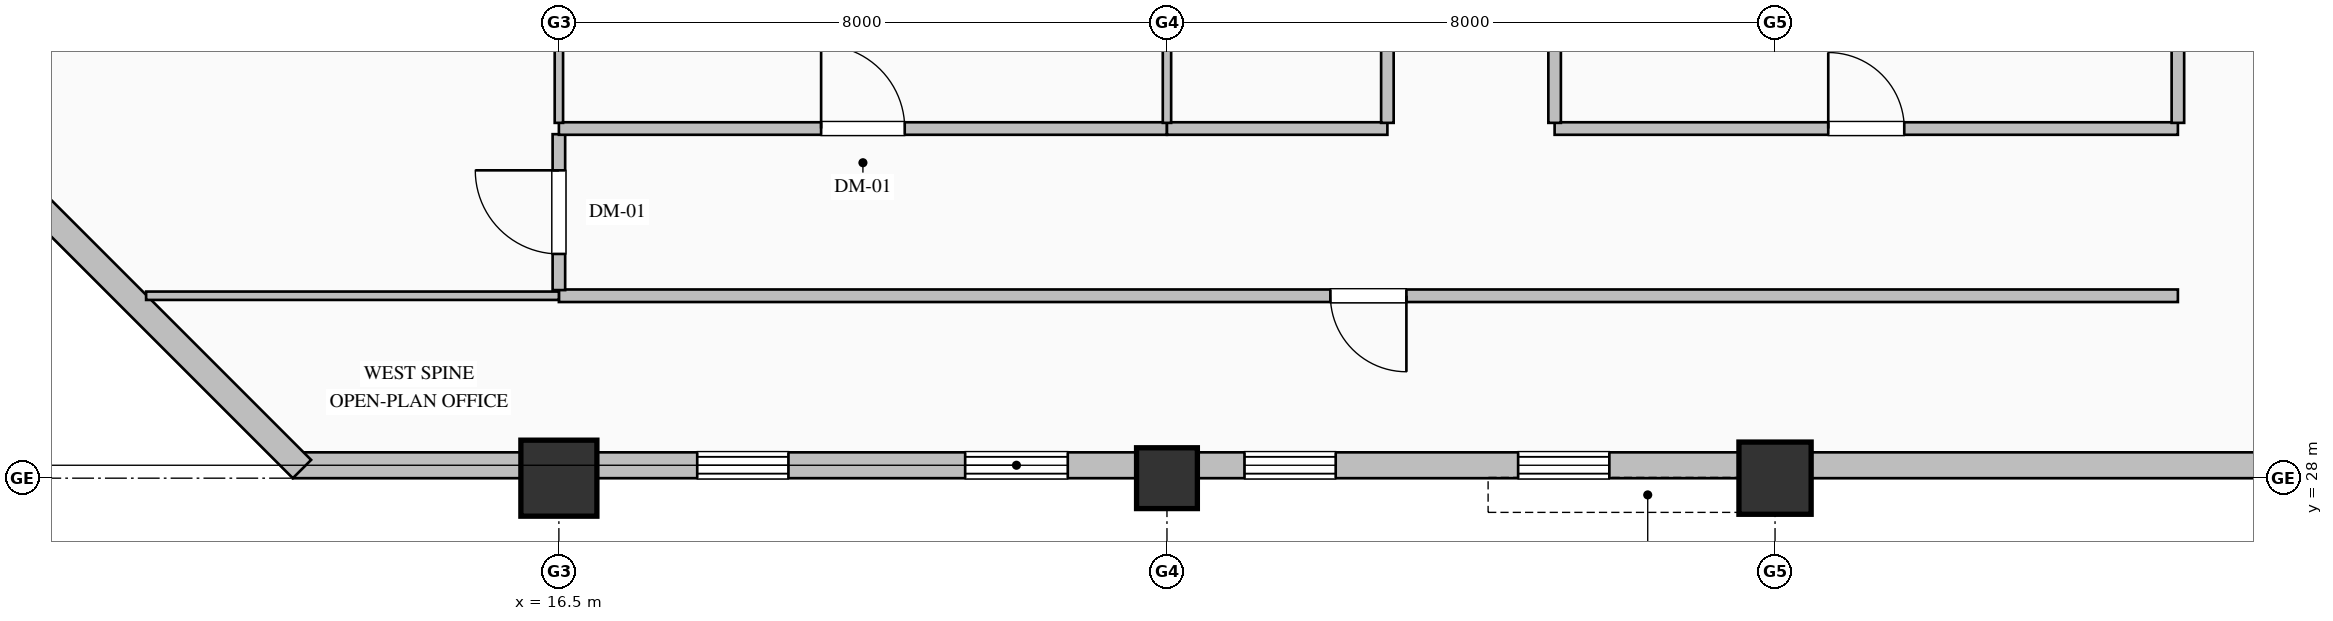
"""IFC4 building model, lengths in metres.
Left out: names, types, materials, properties, quantities, classifications, styles, units other than length and angle.
Written with IfcOpenShell. Run it as: python <this file> out.ifc"""

import sys

from ifc_helpers import new_model, si_unit, direction, frame, frame_2d, origin, origin_2d, place, context, subcontext, project, spatial, rectangle, hollow_rectangle, hollow_circle, extrude, element, fill, save


model = new_model("IFC4")
c1 = context("Model", 3, precision=1e-05, world=origin(), true_north=direction((0.0, 1.0)))
c2 = subcontext(c1, "Body", "Model", "MODEL_VIEW")
j1 = project(units=[si_unit("LENGTHUNIT", "METRE"), si_unit("PLANEANGLEUNIT", "RADIAN")], contexts=[c1])
p1 = place(None, origin())
s1 = spatial("IfcSite", under=j1, at=p1, CompositionType="ELEMENT")
p2 = place(p1, origin())
s2 = spatial("IfcBuilding", under=s1, at=p2, CompositionType="ELEMENT")
p3 = place(p2, frame((0.0, 0.0, 221.8)))
s3 = spatial("IfcBuildingStorey", under=s2, at=p3, CompositionType="ELEMENT", Elevation=221.8)
p4 = place(p3, frame((16.5, 28.0, 0.0), z_axis=(0.0, 0.0, 1.0), x_axis=(1.0, 0.0, 0.0)))
e1 = element("IfcColumn", 1, at=p4, inside=s3, PredefinedType="COLUMN", context=c2, shape_type="SweptSolid", body=[
    extrude(hollow_circle(Radius=0.5, WallThickness=0.036, at=origin_2d()), origin(), (0.0, 0.0, 1.0), 4.0),
])
p5 = place(p3, frame((24.5, 28.0, 0.0), z_axis=(0.0, 0.0, 1.0), x_axis=(1.0, 0.0, 0.0)))
e2 = element("IfcColumn", 2, at=p5, inside=s3, PredefinedType="COLUMN", context=c2, shape_type="SweptSolid", body=[
    extrude(hollow_rectangle(XDim=0.8, YDim=0.8, WallThickness=0.032, at=origin_2d()), origin(), (0.0, 0.0, 1.0), 4.0),
])
p6 = place(p3, frame((32.5, 28.0, 0.0), z_axis=(0.0, 0.0, 1.0), x_axis=(1.0, 0.0, 0.0)))
e3 = element("IfcColumn", 3, at=p6, inside=s3, PredefinedType="COLUMN", context=c2, shape_type="SweptSolid", body=[
    extrude(hollow_rectangle(XDim=0.95, YDim=0.95, WallThickness=0.036, at=origin_2d()), origin(), (0.0, 0.0, 1.0), 4.0),
])
p7 = place(p3, frame((40.52, 28.17, 0.0), z_axis=(0.0, 0.0, 1.0), x_axis=(-1.0, 0.0, 0.0)))
e4 = element("IfcWall", 4, at=p7, inside=s3, PredefinedType="SOLIDWALL", context=c2, shape_type="SweptSolid", body=[
    extrude(rectangle(XDim=27.52, YDim=0.34, at=frame_2d((13.76, 0.0))), origin(), (0.0, 0.0, 1.0), 3.187),
])
p8 = place(p7, frame((10.2, 0.0, 0.7)))
e5 = element("IfcOpeningElement", 5, at=p8, cuts=e4, PredefinedType="OPENING", context=c2, shape_type="SweptSolid", body=[
    extrude(rectangle(XDim=1.2, YDim=1.85, at=frame_2d((0.6, 0.925))), frame((0.0, 0.18, 0.0), z_axis=(0.0, -1.0, 0.0), x_axis=(1.0, 0.0, 0.0)), (0.0, 0.0, 1.0), 0.36),
])
p9 = place(p7, frame((13.8, 0.0, 0.9)))
e6 = element("IfcOpeningElement", 6, at=p9, cuts=e4, PredefinedType="OPENING", context=c2, shape_type="SweptSolid", body=[
    extrude(rectangle(XDim=1.2, YDim=1.85, at=frame_2d((0.6, 0.925))), frame((0.0, 0.18, 0.0), z_axis=(0.0, -1.0, 0.0), x_axis=(1.0, 0.0, 0.0)), (0.0, 0.0, 1.0), 0.36),
])
p10 = place(p7, frame((17.325, 0.0, 0.9)))
e7 = element("IfcOpeningElement", 7, at=p10, cuts=e4, PredefinedType="OPENING", context=c2, shape_type="SweptSolid", body=[
    extrude(rectangle(XDim=1.35, YDim=1.85, at=frame_2d((0.675, 0.925))), frame((0.0, 0.18, 0.0), z_axis=(0.0, -1.0, 0.0), x_axis=(1.0, 0.0, 0.0)), (0.0, 0.0, 1.0), 0.36),
])
p11 = place(p7, frame((21.0, 0.0, 0.7)))
e8 = element("IfcOpeningElement", 8, at=p11, cuts=e4, PredefinedType="OPENING", context=c2, shape_type="SweptSolid", body=[
    extrude(rectangle(XDim=1.2, YDim=1.85, at=frame_2d((0.6, 0.925))), frame((0.0, 0.18, 0.0), z_axis=(0.0, -1.0, 0.0), x_axis=(1.0, 0.0, 0.0)), (0.0, 0.0, 1.0), 0.36),
])
p12 = place(p3, frame((13.12, 28.12, 0.0), z_axis=(0.0, 0.0, 1.0), x_axis=(-0.707106781187, 0.707106781187, 0.0)))
e9 = element("IfcWall", 9, at=p12, inside=s3, PredefinedType="SOLIDWALL", context=c2, shape_type="SweptSolid", body=[
    extrude(rectangle(XDim=5.657, YDim=0.34, at=frame_2d((2.828, 0.0))), origin(), (0.0, 0.0, 1.0), 3.775),
])
p13 = place(p3, frame((37.8, 30.4, 0.0), z_axis=(0.0, 0.0, 1.0), x_axis=(-1.0, 0.0, 0.0)))
e10 = element("IfcWall", 10, at=p13, inside=s3, PredefinedType="PARTITIONING", context=c2, shape_type="SweptSolid", body=[
    extrude(rectangle(XDim=21.3, YDim=0.165, at=frame_2d((10.65, 0.0))), origin(), (0.0, 0.0, 1.0), 3.775),
])
p14 = place(p13, frame((10.15, 0.0, 0.0)))
e11 = element("IfcOpeningElement", 11, at=p14, cuts=e10, PredefinedType="OPENING", context=c2, shape_type="SweptSolid", body=[
    extrude(rectangle(XDim=1.0, YDim=2.15, at=frame_2d((0.5, 1.075))), frame((0.0, 0.093, 0.0), z_axis=(0.0, -1.0, 0.0), x_axis=(1.0, 0.0, 0.0)), (0.0, 0.0, 1.0), 0.185),
])
p15 = place(p3, frame((16.5, 30.475, 0.0), z_axis=(0.0, 0.0, 1.0), x_axis=(0.0, 1.0, 0.0)))
e12 = element("IfcWall", 12, at=p15, inside=s3, PredefinedType="PARTITIONING", context=c2, shape_type="SweptSolid", body=[
    extrude(rectangle(XDim=2.051, YDim=0.165, at=frame_2d((1.025, 0.0))), origin(), (0.0, 0.0, 1.0), 3.179),
])
p16 = place(p15, frame((0.476, 0.0, 0.0)))
e13 = element("IfcOpeningElement", 13, at=p16, cuts=e12, PredefinedType="OPENING", context=c2, shape_type="SweptSolid", body=[
    extrude(rectangle(XDim=1.1, YDim=2.2, at=frame_2d((0.55, 1.1))), frame((0.0, 0.093, 0.0), z_axis=(0.0, -1.0, 0.0), x_axis=(1.0, 0.0, 0.0)), (0.0, 0.0, 1.0), 0.185),
])
p17 = place(p3, frame((16.5, 32.6, 0.0), z_axis=(0.0, 0.0, 1.0), x_axis=(1.0, 0.0, 0.0)))
e14 = element("IfcWall", 14, at=p17, inside=s3, PredefinedType="PARTITIONING", context=c2, shape_type="SweptSolid", body=[
    extrude(rectangle(XDim=8.0, YDim=0.165, at=frame_2d((4.0, 0.0))), origin(), (0.0, 0.0, 1.0), 3.775),
])
p18 = place(p17, frame((3.45, 0.0, 0.0)))
e15 = element("IfcOpeningElement", 15, at=p18, cuts=e14, PredefinedType="OPENING", context=c2, shape_type="SweptSolid", body=[
    extrude(rectangle(XDim=1.1, YDim=2.2, at=frame_2d((0.55, 1.1))), frame((0.0, 0.093, 0.0), z_axis=(0.0, -1.0, 0.0), x_axis=(1.0, 0.0, 0.0)), (0.0, 0.0, 1.0), 0.185),
])
p19 = place(p3, frame((24.5, 32.6, 0.0), z_axis=(0.0, 0.0, 1.0), x_axis=(1.0, 0.0, 0.0)))
e16 = element("IfcWall", 16, at=p19, inside=s3, PredefinedType="PARTITIONING", context=c2, shape_type="SweptSolid", body=[
    extrude(rectangle(XDim=2.9, YDim=0.165, at=frame_2d((1.45, 0.0))), origin(), (0.0, 0.0, 1.0), 3.775),
])
p20 = place(p3, frame((29.6, 32.6, 0.0), z_axis=(0.0, 0.0, 1.0), x_axis=(1.0, 0.0, 0.0)))
e17 = element("IfcWall", 17, at=p20, inside=s3, PredefinedType="PARTITIONING", context=c2, shape_type="SweptSolid", body=[
    extrude(rectangle(XDim=8.2, YDim=0.165, at=frame_2d((4.1, 0.0))), origin(), (0.0, 0.0, 1.0), 3.775),
])
p21 = place(p20, frame((3.6, 0.0, 0.0)))
e18 = element("IfcOpeningElement", 18, at=p21, cuts=e17, PredefinedType="OPENING", context=c2, shape_type="SweptSolid", body=[
    extrude(rectangle(XDim=1.0, YDim=2.15, at=frame_2d((0.5, 1.075))), frame((0.0, 0.093, 0.0), z_axis=(0.0, -1.0, 0.0), x_axis=(1.0, 0.0, 0.0)), (0.0, 0.0, 1.0), 0.185),
])
p22 = place(p3, frame((27.4, 32.675, 0.0), z_axis=(0.0, 0.0, 1.0), x_axis=(0.0, 1.0, 0.0)))
e19 = element("IfcWall", 19, at=p22, inside=s3, PredefinedType="PARTITIONING", context=c2, shape_type="SweptSolid", body=[
    extrude(rectangle(XDim=13.725, YDim=0.165, at=frame_2d((6.863, 0.0))), origin(), (0.0, 0.0, 1.0), 3.775),
])
p23 = place(p22, frame((6.363, 0.0, 0.0)))
e20 = element("IfcOpeningElement", 20, at=p23, cuts=e19, PredefinedType="OPENING", context=c2, shape_type="SweptSolid", body=[
    extrude(rectangle(XDim=1.0, YDim=2.15, at=frame_2d((0.5, 1.075))), frame((0.0, 0.093, 0.0), z_axis=(0.0, -1.0, 0.0), x_axis=(1.0, 0.0, 0.0)), (0.0, 0.0, 1.0), 0.185),
])
for number, where, z_axis, x_axis in (
    (21, (29.6, 35.953, 0.0), (0.0, 0.0, 1.0), (0.0, -1.0, 0.0)),
    (22, (37.8, 32.675, 0.0), (0.0, 0.0, 1.0), (0.0, 1.0, 0.0)),
):
    element("IfcWall", number, at=place(p3, frame(where, z_axis=z_axis, x_axis=x_axis)), inside=s3, PredefinedType="PARTITIONING", context=c2, shape_type="SweptSolid", body=[
        extrude(rectangle(XDim=3.278, YDim=0.165, at=frame_2d((1.639, 0.0))), origin(), (0.0, 0.0, 1.0), 3.775),
    ])
p24 = place(p3, frame((11.07, 30.4, 0.0), z_axis=(0.0, 0.0, 1.0), x_axis=(1.0, 0.0, 0.0)))
e23 = element("IfcWall", 23, at=p24, inside=s3, PredefinedType="MOVABLE", context=c2, shape_type="SweptSolid", body=[
    extrude(rectangle(XDim=5.43, YDim=0.11, at=frame_2d((2.715, 0.0))), origin(), (0.0, 0.0, 1.0), 3.775),
])
for number, where, z_axis, x_axis in (
    (24, (16.5, 51.668, 0.0), (0.0, 0.0, 1.0), (0.0, -1.0, 0.0)),
    (25, (24.5, 51.668, 0.0), (0.0, 0.0, 1.0), (0.0, -1.0, 0.0)),
):
    element("IfcWall", number, at=place(p3, frame(where, z_axis=z_axis, x_axis=x_axis)), inside=s3, PredefinedType="MOVABLE", context=c2, shape_type="SweptSolid", body=[
        extrude(rectangle(XDim=18.993, YDim=0.11, at=frame_2d((9.497, 0.0))), origin(), (0.0, 0.0, 1.0), 3.179),
    ])
p25 = place(p8, origin())
e26 = element("IfcWindow", 26, at=p25, inside=s3, PartitioningType="DOUBLE_PANEL_VERTICAL", PredefinedType="WINDOW", context=c2, shape_type="SweptSolid", body=[
    extrude(rectangle(XDim=1.2, YDim=1.85, at=frame_2d((0.6, 0.925))), frame((0.0, 0.15, 0.0), z_axis=(0.0, -1.0, 0.0), x_axis=(1.0, 0.0, 0.0)), (0.0, 0.0, 1.0), 0.06),
])
fill(e5, e26)
p26 = place(p9, origin())
e27 = element("IfcWindow", 27, at=p26, inside=s3, PartitioningType="DOUBLE_PANEL_VERTICAL", PredefinedType="WINDOW", context=c2, shape_type="SweptSolid", body=[
    extrude(rectangle(XDim=1.2, YDim=1.85, at=frame_2d((0.6, 0.925))), frame((0.0, 0.15, 0.0), z_axis=(0.0, -1.0, 0.0), x_axis=(1.0, 0.0, 0.0)), (0.0, 0.0, 1.0), 0.06),
])
fill(e6, e27)
p27 = place(p10, origin())
e28 = element("IfcWindow", 28, at=p27, inside=s3, PartitioningType="DOUBLE_PANEL_VERTICAL", PredefinedType="WINDOW", context=c2, shape_type="SweptSolid", body=[
    extrude(rectangle(XDim=1.35, YDim=1.85, at=frame_2d((0.675, 0.925))), frame((0.0, 0.15, 0.0), z_axis=(0.0, -1.0, 0.0), x_axis=(1.0, 0.0, 0.0)), (0.0, 0.0, 1.0), 0.06),
])
fill(e7, e28)
p28 = place(p11, origin())
e29 = element("IfcWindow", 29, at=p28, inside=s3, PartitioningType="DOUBLE_PANEL_VERTICAL", PredefinedType="WINDOW", context=c2, shape_type="SweptSolid", body=[
    extrude(rectangle(XDim=1.2, YDim=1.85, at=frame_2d((0.6, 0.925))), frame((0.0, 0.15, 0.0), z_axis=(0.0, -1.0, 0.0), x_axis=(1.0, 0.0, 0.0)), (0.0, 0.0, 1.0), 0.06),
])
fill(e8, e29)
p29 = place(p14, origin())
e30 = element("IfcDoor", 30, at=p29, inside=s3, OperationType="SINGLE_SWING_LEFT", PredefinedType="DOOR", context=c2, shape_type="SweptSolid", body=[
    extrude(rectangle(XDim=1.0, YDim=2.15, at=frame_2d((0.5, 1.075))), frame((0.0, 0.025, 0.0), z_axis=(0.0, -1.0, 0.0), x_axis=(1.0, 0.0, 0.0)), (0.0, 0.0, 1.0), 0.05),
])
fill(e11, e30)
p30 = place(p16, origin())
e31 = element("IfcDoor", 31, at=p30, inside=s3, OperationType="SINGLE_SWING_RIGHT", PredefinedType="DOOR", context=c2, shape_type="SweptSolid", body=[
    extrude(rectangle(XDim=1.1, YDim=2.2, at=frame_2d((0.55, 1.1))), frame((0.0, 0.025, 0.0), z_axis=(0.0, -1.0, 0.0), x_axis=(1.0, 0.0, 0.0)), (0.0, 0.0, 1.0), 0.05),
])
fill(e13, e31)
p31 = place(p18, origin())
e32 = element("IfcDoor", 32, at=p31, inside=s3, OperationType="SINGLE_SWING_LEFT", PredefinedType="DOOR", context=c2, shape_type="SweptSolid", body=[
    extrude(rectangle(XDim=1.1, YDim=2.2, at=frame_2d((0.55, 1.1))), frame((0.0, 0.025, 0.0), z_axis=(0.0, -1.0, 0.0), x_axis=(1.0, 0.0, 0.0)), (0.0, 0.0, 1.0), 0.05),
])
fill(e15, e32)
p32 = place(p21, origin())
e33 = element("IfcDoor", 33, at=p32, inside=s3, OperationType="SINGLE_SWING_LEFT", PredefinedType="DOOR", context=c2, shape_type="SweptSolid", body=[
    extrude(rectangle(XDim=1.0, YDim=2.15, at=frame_2d((0.5, 1.075))), frame((0.0, 0.025, 0.0), z_axis=(0.0, -1.0, 0.0), x_axis=(1.0, 0.0, 0.0)), (0.0, 0.0, 1.0), 0.05),
])
fill(e18, e33)
save(model, sys.argv[1])
